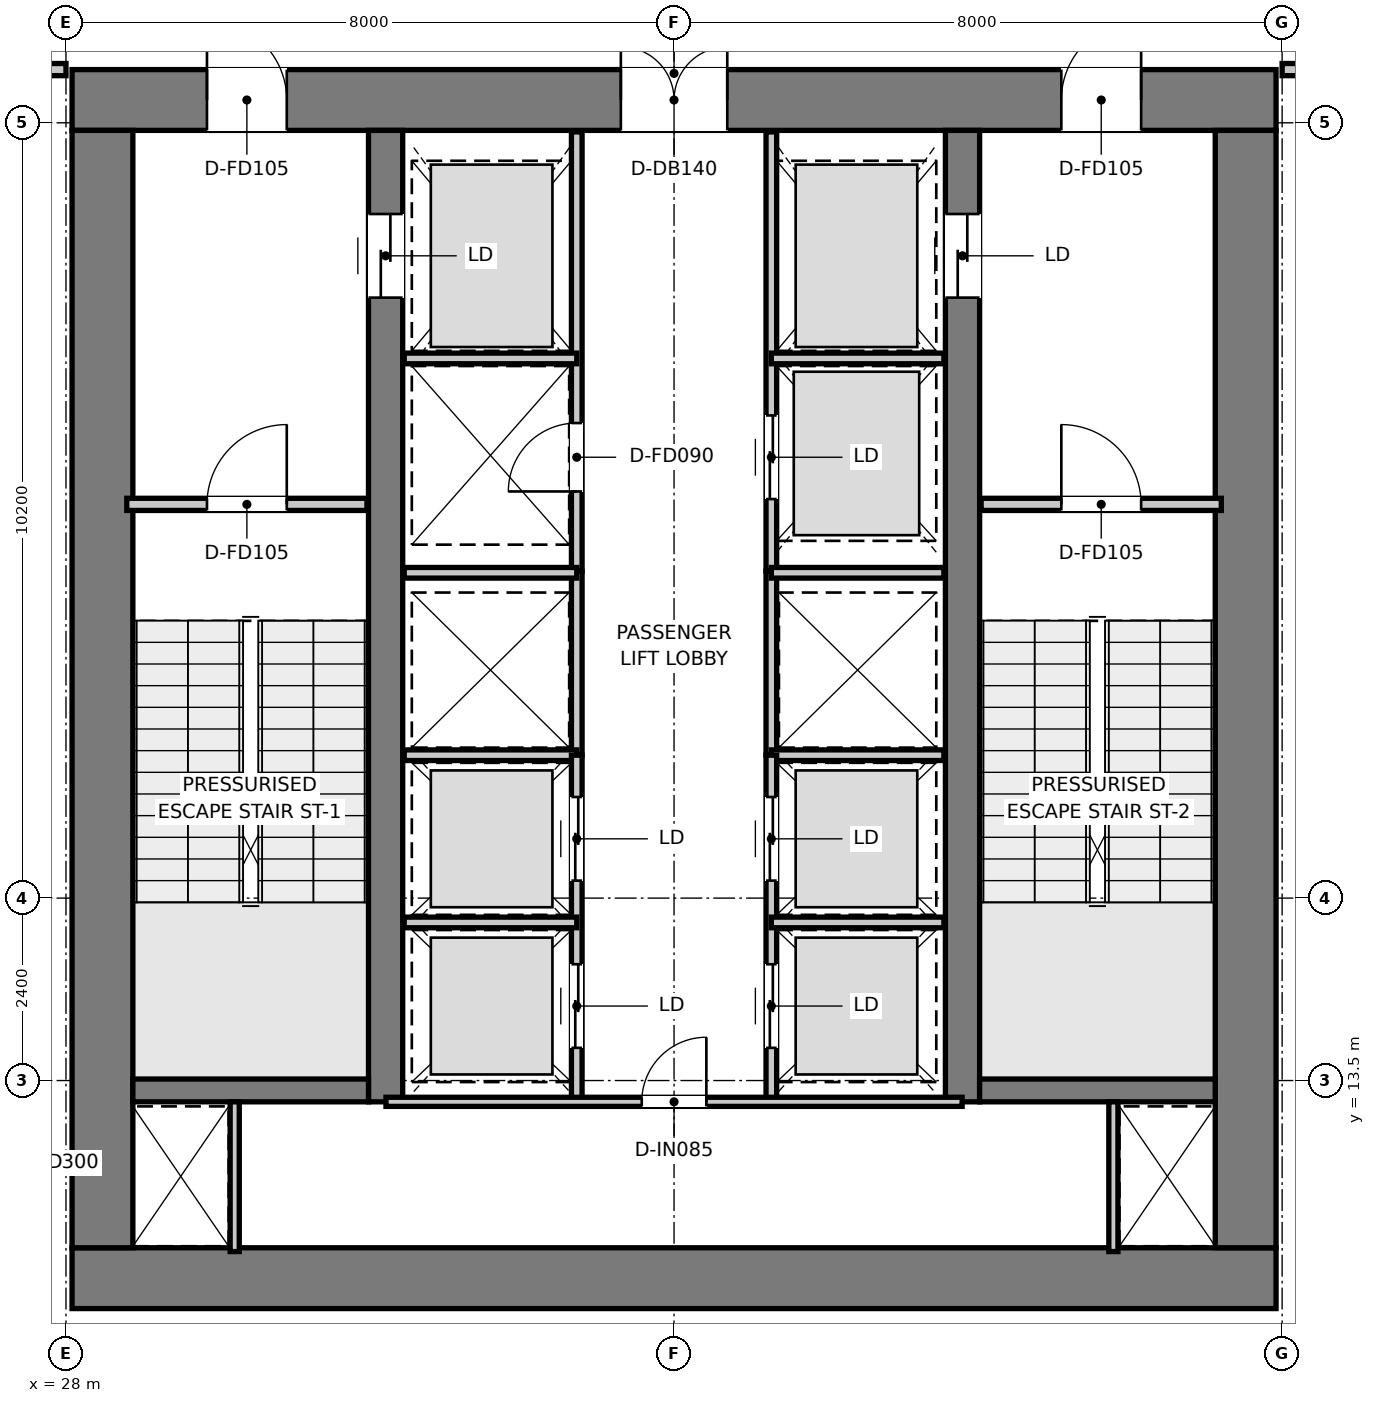
"""IFC4 building model, lengths in metres.
Left out: names, types, materials, properties, quantities, classifications, styles, units other than length and angle.
Written with IfcOpenShell. Run it as: python <this file> out.ifc"""

import sys

from ifc_helpers import new_model, si_unit, direction, frame, frame_2d, origin, place, context, subcontext, project, spatial, rectangle, extrude, element, fill, save


model = new_model("IFC4")
c1 = context("Model", 3, precision=1e-05, world=origin(), true_north=direction((0.0, 1.0)))
c2 = subcontext(c1, "Body", "Model", "MODEL_VIEW")
j1 = project(units=[si_unit("LENGTHUNIT", "METRE"), si_unit("PLANEANGLEUNIT", "RADIAN")], contexts=[c1])
p1 = place(None, origin())
s1 = spatial("IfcSite", under=j1, at=p1, CompositionType="ELEMENT")
p2 = place(p1, origin())
s2 = spatial("IfcBuilding", under=s1, at=p2, CompositionType="ELEMENT")
p3 = place(p2, frame((0.0, 0.0, 15.4)))
s3 = spatial("IfcBuildingStorey", under=s2, at=p3, CompositionType="ELEMENT", Elevation=15.4)
p4 = place(p3, frame((28.08, 10.9, 0.0), z_axis=(0.0, 0.0, 1.0), x_axis=(1.0, 0.0, 0.0)))
e1 = element("IfcWall", 1, at=p4, inside=s3, PredefinedType="SHEAR", context=c2, shape_type="SweptSolid", body=[
    extrude(rectangle(XDim=15.84, YDim=0.8, at=frame_2d((7.92, 0.0))), origin(), (0.0, 0.0, 1.0), 4.6),
])
p5 = place(p3, frame((28.08, 26.4, 0.0), z_axis=(0.0, 0.0, 1.0), x_axis=(1.0, 0.0, 0.0)))
e2 = element("IfcWall", 2, at=p5, inside=s3, PredefinedType="SHEAR", context=c2, shape_type="SweptSolid", body=[
    extrude(rectangle(XDim=15.84, YDim=0.8, at=frame_2d((7.92, 0.0))), origin(), (0.0, 0.0, 1.0), 4.6),
])
p6 = place(p5, frame((7.22, 0.0, 0.0)))
e3 = element("IfcOpeningElement", 3, at=p6, cuts=e2, PredefinedType="OPENING", context=c2, shape_type="SweptSolid", body=[
    extrude(rectangle(XDim=1.4, YDim=2.2, at=frame_2d((0.7, 1.1))), frame((0.0, 0.41, 0.0), z_axis=(0.0, -1.0, 0.0), x_axis=(1.0, 0.0, 0.0)), (0.0, 0.0, 1.0), 0.82),
])
p7 = place(p5, frame((1.775, 0.0, 0.0)))
e4 = element("IfcOpeningElement", 4, at=p7, cuts=e2, PredefinedType="OPENING", context=c2, shape_type="SweptSolid", body=[
    extrude(rectangle(XDim=1.05, YDim=2.1, at=frame_2d((0.525, 1.05))), frame((0.0, 0.41, 0.0), z_axis=(0.0, -1.0, 0.0), x_axis=(1.0, 0.0, 0.0)), (0.0, 0.0, 1.0), 0.82),
])
p8 = place(p5, frame((13.015, 0.0, 0.0)))
e5 = element("IfcOpeningElement", 5, at=p8, cuts=e2, PredefinedType="OPENING", context=c2, shape_type="SweptSolid", body=[
    extrude(rectangle(XDim=1.05, YDim=2.1, at=frame_2d((0.525, 1.05))), frame((0.0, 0.41, 0.0), z_axis=(0.0, -1.0, 0.0), x_axis=(1.0, 0.0, 0.0)), (0.0, 0.0, 1.0), 0.82),
])
for number, where, z_axis, x_axis in (
    (6, (28.48, 11.3, 0.0), (0.0, 0.0, 1.0), (0.0, 1.0, 0.0)),
    (7, (43.52, 11.3, 0.0), (0.0, 0.0, 1.0), (0.0, 1.0, 0.0)),
):
    element("IfcWall", number, at=place(p3, frame(where, z_axis=z_axis, x_axis=x_axis)), inside=s3, PredefinedType="SHEAR", context=c2, shape_type="SweptSolid", body=[
        extrude(rectangle(XDim=14.7, YDim=0.8, at=frame_2d((7.35, 0.0))), origin(), (0.0, 0.0, 1.0), 4.6),
    ])
p9 = place(p3, frame((32.205, 13.22, 0.0), z_axis=(0.0, 0.0, 1.0), x_axis=(0.0, 1.0, 0.0)))
e8 = element("IfcWall", 8, at=p9, inside=s3, PredefinedType="SHEAR", context=c2, shape_type="SweptSolid", body=[
    extrude(rectangle(XDim=12.78, YDim=0.45, at=frame_2d((6.39, 0.0))), origin(), (0.0, 0.0, 1.0), 4.6),
])
p10 = place(p9, frame((10.58, 0.0, 0.0)))
e9 = element("IfcOpeningElement", 9, at=p10, cuts=e8, PredefinedType="OPENING", context=c2, shape_type="SweptSolid", body=[
    extrude(rectangle(XDim=1.1, YDim=2.15, at=frame_2d((0.55, 1.075))), frame((0.0, 0.235, 0.0), z_axis=(0.0, -1.0, 0.0), x_axis=(1.0, 0.0, 0.0)), (0.0, 0.0, 1.0), 0.47),
])
p11 = place(p3, frame((39.795, 13.22, 0.0), z_axis=(0.0, 0.0, 1.0), x_axis=(0.0, 1.0, 0.0)))
e10 = element("IfcWall", 10, at=p11, inside=s3, PredefinedType="SHEAR", context=c2, shape_type="SweptSolid", body=[
    extrude(rectangle(XDim=12.78, YDim=0.45, at=frame_2d((6.39, 0.0))), origin(), (0.0, 0.0, 1.0), 4.6),
])
p12 = place(p11, frame((10.58, 0.0, 0.0)))
e11 = element("IfcOpeningElement", 11, at=p12, cuts=e10, PredefinedType="OPENING", context=c2, shape_type="SweptSolid", body=[
    extrude(rectangle(XDim=1.1, YDim=2.15, at=frame_2d((0.55, 1.075))), frame((0.0, 0.235, 0.0), z_axis=(0.0, -1.0, 0.0), x_axis=(1.0, 0.0, 0.0)), (0.0, 0.0, 1.0), 0.47),
])
for number, where, z_axis, x_axis in (
    (12, (28.88, 13.37, 0.0), (0.0, 0.0, 1.0), (1.0, 0.0, 0.0)),
    (13, (40.02, 13.37, 0.0), (0.0, 0.0, 1.0), (1.0, 0.0, 0.0)),
):
    element("IfcWall", number, at=place(p3, frame(where, z_axis=z_axis, x_axis=x_axis)), inside=s3, PredefinedType="SHEAR", context=c2, shape_type="SweptSolid", body=[
        extrude(rectangle(XDim=3.1, YDim=0.3, at=frame_2d((1.55, 0.0))), origin(), (0.0, 0.0, 1.0), 4.6),
    ])
p13 = place(p3, frame((28.8, 21.08, 0.0), z_axis=(0.0, 0.0, 1.0), x_axis=(1.0, 0.0, 0.0)))
e14 = element("IfcWall", 14, at=p13, inside=s3, PredefinedType="PARTITIONING", context=c2, shape_type="SweptSolid", body=[
    extrude(rectangle(XDim=3.16, YDim=0.16, at=frame_2d((1.58, 0.0))), origin(), (0.0, 0.0, 1.0), 4.25),
])
p14 = place(p13, frame((1.055, 0.0, 0.0)))
e15 = element("IfcOpeningElement", 15, at=p14, cuts=e14, PredefinedType="OPENING", context=c2, shape_type="SweptSolid", body=[
    extrude(rectangle(XDim=1.05, YDim=2.1, at=frame_2d((0.525, 1.05))), frame((0.0, 0.09, 0.0), z_axis=(0.0, -1.0, 0.0), x_axis=(1.0, 0.0, 0.0)), (0.0, 0.0, 1.0), 0.18),
])
p15 = place(p3, frame((40.04, 21.08, 0.0), z_axis=(0.0, 0.0, 1.0), x_axis=(1.0, 0.0, 0.0)))
e16 = element("IfcWall", 16, at=p15, inside=s3, PredefinedType="PARTITIONING", context=c2, shape_type="SweptSolid", body=[
    extrude(rectangle(XDim=3.16, YDim=0.16, at=frame_2d((1.58, 0.0))), origin(), (0.0, 0.0, 1.0), 4.25),
])
p16 = place(p15, frame((1.055, 0.0, 0.0)))
e17 = element("IfcOpeningElement", 17, at=p16, cuts=e16, PredefinedType="OPENING", context=c2, shape_type="SweptSolid", body=[
    extrude(rectangle(XDim=1.05, YDim=2.1, at=frame_2d((0.525, 1.05))), frame((0.0, 0.09, 0.0), z_axis=(0.0, -1.0, 0.0), x_axis=(1.0, 0.0, 0.0)), (0.0, 0.0, 1.0), 0.18),
])
p17 = place(p3, frame((34.72, 20.2, 0.0), z_axis=(0.0, 0.0, 1.0), x_axis=(0.0, 1.0, 0.0)))
e18 = element("IfcWall", 18, at=p17, inside=s3, PredefinedType="PARTITIONING", context=c2, shape_type="SweptSolid", body=[
    extrude(rectangle(XDim=5.78, YDim=0.14, at=frame_2d((2.89, 0.0))), origin(), (0.0, 0.0, 1.0), 3.05),
])
p18 = place(p17, frame((1.05, 0.0, 0.0)))
e19 = element("IfcOpeningElement", 19, at=p18, cuts=e18, PredefinedType="OPENING", context=c2, shape_type="SweptSolid", body=[
    extrude(rectangle(XDim=0.9, YDim=2.1, at=frame_2d((0.45, 1.05))), frame((0.0, 0.08, 0.0), z_axis=(0.0, -1.0, 0.0), x_axis=(1.0, 0.0, 0.0)), (0.0, 0.0, 1.0), 0.16),
])
p19 = place(p3, frame((37.28, 20.2, 0.0), z_axis=(0.0, 0.0, 1.0), x_axis=(0.0, 1.0, 0.0)))
e20 = element("IfcWall", 20, at=p19, inside=s3, PredefinedType="PARTITIONING", context=c2, shape_type="SweptSolid", body=[
    extrude(rectangle(XDim=5.78, YDim=0.14, at=frame_2d((2.89, 0.0))), origin(), (0.0, 0.0, 1.0), 3.05),
])
p20 = place(p19, frame((0.95, 0.0, 0.0)))
e21 = element("IfcOpeningElement", 21, at=p20, cuts=e20, PredefinedType="OPENING", context=c2, shape_type="SweptSolid", body=[
    extrude(rectangle(XDim=1.1, YDim=2.15, at=frame_2d((0.55, 1.075))), frame((0.0, 0.08, 0.0), z_axis=(0.0, -1.0, 0.0), x_axis=(1.0, 0.0, 0.0)), (0.0, 0.0, 1.0), 0.16),
])
for number, where, z_axis, x_axis in (
    (22, (32.45, 23.0, 0.0), (0.0, 0.0, 1.0), (1.0, 0.0, 0.0)),
    (23, (37.28, 23.0, 0.0), (0.0, 0.0, 1.0), (1.0, 0.0, 0.0)),
):
    element("IfcWall", number, at=place(p3, frame(where, z_axis=z_axis, x_axis=x_axis)), inside=s3, PredefinedType="PARTITIONING", context=c2, shape_type="SweptSolid", body=[
        extrude(rectangle(XDim=2.27, YDim=0.14, at=frame_2d((1.135, 0.0))), origin(), (0.0, 0.0, 1.0), 3.05),
    ])
for number, where, z_axis, x_axis in (
    (24, (34.72, 17.78, 0.0), (0.0, 0.0, 1.0), (0.0, 1.0, 0.0)),
    (25, (37.28, 17.78, 0.0), (0.0, 0.0, 1.0), (0.0, 1.0, 0.0)),
):
    element("IfcWall", number, at=place(p3, frame(where, z_axis=z_axis, x_axis=x_axis)), inside=s3, PredefinedType="PARTITIONING", context=c2, shape_type="SweptSolid", body=[
        extrude(rectangle(XDim=2.42, YDim=0.14, at=frame_2d((1.21, 0.0))), origin(), (0.0, 0.0, 1.0), 4.25),
    ])
for number, where, z_axis, x_axis in (
    (26, (32.45, 17.78, 0.0), (0.0, 0.0, 1.0), (1.0, 0.0, 0.0)),
    (27, (32.45, 20.18, 0.0), (0.0, 0.0, 1.0), (1.0, 0.0, 0.0)),
    (28, (37.28, 17.78, 0.0), (0.0, 0.0, 1.0), (1.0, 0.0, 0.0)),
    (29, (37.28, 20.18, 0.0), (0.0, 0.0, 1.0), (1.0, 0.0, 0.0)),
):
    element("IfcWall", number, at=place(p3, frame(where, z_axis=z_axis, x_axis=x_axis)), inside=s3, PredefinedType="PARTITIONING", context=c2, shape_type="SweptSolid", body=[
        extrude(rectangle(XDim=2.27, YDim=0.14, at=frame_2d((1.135, 0.0))), origin(), (0.0, 0.0, 1.0), 4.25),
    ])
p21 = place(p3, frame((34.72, 13.22, 0.0), z_axis=(0.0, 0.0, 1.0), x_axis=(0.0, 1.0, 0.0)))
e30 = element("IfcWall", 30, at=p21, inside=s3, PredefinedType="PARTITIONING", context=c2, shape_type="SweptSolid", body=[
    extrude(rectangle(XDim=4.56, YDim=0.14, at=frame_2d((2.28, 0.0))), origin(), (0.0, 0.0, 1.0), 4.25),
])
p22 = place(p21, frame((0.71, 0.0, 0.0)))
e31 = element("IfcOpeningElement", 31, at=p22, cuts=e30, PredefinedType="OPENING", context=c2, shape_type="SweptSolid", body=[
    extrude(rectangle(XDim=1.1, YDim=2.15, at=frame_2d((0.55, 1.075))), frame((0.0, 0.08, 0.0), z_axis=(0.0, -1.0, 0.0), x_axis=(1.0, 0.0, 0.0)), (0.0, 0.0, 1.0), 0.16),
])
p23 = place(p21, frame((2.91, 0.0, 0.0)))
e32 = element("IfcOpeningElement", 32, at=p23, cuts=e30, PredefinedType="OPENING", context=c2, shape_type="SweptSolid", body=[
    extrude(rectangle(XDim=1.1, YDim=2.15, at=frame_2d((0.55, 1.075))), frame((0.0, 0.08, 0.0), z_axis=(0.0, -1.0, 0.0), x_axis=(1.0, 0.0, 0.0)), (0.0, 0.0, 1.0), 0.16),
])
p24 = place(p3, frame((32.45, 15.58, 0.0), z_axis=(0.0, 0.0, 1.0), x_axis=(1.0, 0.0, 0.0)))
e33 = element("IfcWall", 33, at=p24, inside=s3, PredefinedType="PARTITIONING", context=c2, shape_type="SweptSolid", body=[
    extrude(rectangle(XDim=2.27, YDim=0.14, at=frame_2d((1.135, 0.0))), origin(), (0.0, 0.0, 1.0), 4.25),
])
p25 = place(p3, frame((37.28, 13.22, 0.0), z_axis=(0.0, 0.0, 1.0), x_axis=(0.0, 1.0, 0.0)))
e34 = element("IfcWall", 34, at=p25, inside=s3, PredefinedType="PARTITIONING", context=c2, shape_type="SweptSolid", body=[
    extrude(rectangle(XDim=4.56, YDim=0.14, at=frame_2d((2.28, 0.0))), origin(), (0.0, 0.0, 1.0), 4.25),
])
p26 = place(p25, frame((0.71, 0.0, 0.0)))
e35 = element("IfcOpeningElement", 35, at=p26, cuts=e34, PredefinedType="OPENING", context=c2, shape_type="SweptSolid", body=[
    extrude(rectangle(XDim=1.1, YDim=2.15, at=frame_2d((0.55, 1.075))), frame((0.0, 0.08, 0.0), z_axis=(0.0, -1.0, 0.0), x_axis=(1.0, 0.0, 0.0)), (0.0, 0.0, 1.0), 0.16),
])
p27 = place(p25, frame((2.91, 0.0, 0.0)))
e36 = element("IfcOpeningElement", 36, at=p27, cuts=e34, PredefinedType="OPENING", context=c2, shape_type="SweptSolid", body=[
    extrude(rectangle(XDim=1.1, YDim=2.15, at=frame_2d((0.55, 1.075))), frame((0.0, 0.08, 0.0), z_axis=(0.0, -1.0, 0.0), x_axis=(1.0, 0.0, 0.0)), (0.0, 0.0, 1.0), 0.16),
])
p28 = place(p3, frame((37.28, 15.58, 0.0), z_axis=(0.0, 0.0, 1.0), x_axis=(1.0, 0.0, 0.0)))
e37 = element("IfcWall", 37, at=p28, inside=s3, PredefinedType="PARTITIONING", context=c2, shape_type="SweptSolid", body=[
    extrude(rectangle(XDim=2.27, YDim=0.14, at=frame_2d((1.135, 0.0))), origin(), (0.0, 0.0, 1.0), 4.25),
])
for number, where, z_axis, x_axis in (
    (38, (30.22, 11.25, 0.0), (0.0, 0.0, 1.0), (0.0, 1.0, 0.0)),
    (39, (41.78, 11.25, 0.0), (0.0, 0.0, 1.0), (0.0, 1.0, 0.0)),
):
    element("IfcWall", number, at=place(p3, frame(where, z_axis=z_axis, x_axis=x_axis)), inside=s3, PredefinedType="PARTITIONING", context=c2, shape_type="SweptSolid", body=[
        extrude(rectangle(XDim=1.97, YDim=0.12, at=frame_2d((0.985, 0.0))), origin(), (0.0, 0.0, 1.0), 4.25),
    ])
p29 = place(p3, frame((32.21, 13.22, 0.0), z_axis=(0.0, 0.0, 1.0), x_axis=(1.0, 0.0, 0.0)))
e40 = element("IfcWall", 40, at=p29, inside=s3, PredefinedType="PARTITIONING", context=c2, shape_type="SweptSolid", body=[
    extrude(rectangle(XDim=7.58, YDim=0.12, at=frame_2d((3.79, 0.0))), origin(), (0.0, 0.0, 1.0), 4.25),
])
p30 = place(p29, frame((3.365, 0.0, 0.0)))
e41 = element("IfcOpeningElement", 41, at=p30, cuts=e40, PredefinedType="OPENING", context=c2, shape_type="SweptSolid", body=[
    extrude(rectangle(XDim=0.85, YDim=2.1, at=frame_2d((0.425, 1.05))), frame((0.0, 0.07, 0.0), z_axis=(0.0, -1.0, 0.0), x_axis=(1.0, 0.0, 0.0)), (0.0, 0.0, 1.0), 0.14),
])
p31 = place(p3, frame((22.32, 26.8, 0.0), z_axis=(0.0, 0.0, 1.0), x_axis=(1.0, 0.0, 0.0)))
e42 = element("IfcWall", 42, at=p31, inside=s3, PredefinedType="PARTITIONING", context=c2, shape_type="SweptSolid", body=[
    extrude(rectangle(XDim=5.68, YDim=0.16, at=frame_2d((2.84, 0.0))), origin(), (0.0, 0.0, 1.0), 3.45),
])
p32 = place(p31, frame((3.63, 0.0, 0.0)))
e43 = element("IfcOpeningElement", 43, at=p32, cuts=e42, PredefinedType="OPENING", context=c2, shape_type="SweptSolid", body=[
    extrude(rectangle(XDim=1.1, YDim=2.15, at=frame_2d((0.55, 1.075))), frame((0.0, 0.09, 0.0), z_axis=(0.0, -1.0, 0.0), x_axis=(1.0, 0.0, 0.0)), (0.0, 0.0, 1.0), 0.18),
])
p33 = place(p3, frame((44.0, 26.8, 0.0), z_axis=(0.0, 0.0, 1.0), x_axis=(1.0, 0.0, 0.0)))
e44 = element("IfcWall", 44, at=p33, inside=s3, PredefinedType="PARTITIONING", context=c2, shape_type="SweptSolid", body=[
    extrude(rectangle(XDim=10.08, YDim=0.16, at=frame_2d((5.04, 0.0))), origin(), (0.0, 0.0, 1.0), 3.45),
])
p34 = place(p33, frame((4.4, 0.0, 0.0)))
e45 = element("IfcOpeningElement", 45, at=p34, cuts=e44, PredefinedType="OPENING", context=c2, shape_type="SweptSolid", body=[
    extrude(rectangle(XDim=1.2, YDim=2.15, at=frame_2d((0.6, 1.075))), frame((0.0, 0.09, 0.0), z_axis=(0.0, -1.0, 0.0), x_axis=(1.0, 0.0, 0.0)), (0.0, 0.0, 1.0), 0.18),
])
p35 = place(p14, origin())
e46 = element("IfcDoor", 46, at=p35, inside=s3, OperationType="SINGLE_SWING_RIGHT", PredefinedType="DOOR", context=c2, shape_type="SweptSolid", body=[
    extrude(rectangle(XDim=1.05, YDim=2.1, at=frame_2d((0.525, 1.05))), frame((0.0, 0.025, 0.0), z_axis=(0.0, -1.0, 0.0), x_axis=(1.0, 0.0, 0.0)), (0.0, 0.0, 1.0), 0.05),
])
fill(e15, e46)
p36 = place(p16, origin())
e47 = element("IfcDoor", 47, at=p36, inside=s3, OperationType="SINGLE_SWING_LEFT", PredefinedType="DOOR", context=c2, shape_type="SweptSolid", body=[
    extrude(rectangle(XDim=1.05, YDim=2.1, at=frame_2d((0.525, 1.05))), frame((0.0, 0.025, 0.0), z_axis=(0.0, -1.0, 0.0), x_axis=(1.0, 0.0, 0.0)), (0.0, 0.0, 1.0), 0.05),
])
fill(e17, e47)
p37 = place(p6, origin())
e48 = element("IfcDoor", 48, at=p37, inside=s3, OperationType="DOUBLE_DOOR_SINGLE_SWING", PredefinedType="DOOR", context=c2, shape_type="SweptSolid", body=[
    extrude(rectangle(XDim=1.4, YDim=2.2, at=frame_2d((0.7, 1.1))), frame((0.0, 0.025, 0.0), z_axis=(0.0, -1.0, 0.0), x_axis=(1.0, 0.0, 0.0)), (0.0, 0.0, 1.0), 0.05),
])
fill(e3, e48)
p38 = place(p7, origin())
e49 = element("IfcDoor", 49, at=p38, inside=s3, OperationType="SINGLE_SWING_LEFT", PredefinedType="DOOR", context=c2, shape_type="SweptSolid", body=[
    extrude(rectangle(XDim=1.05, YDim=2.1, at=frame_2d((0.525, 1.05))), frame((0.0, 0.025, 0.0), z_axis=(0.0, -1.0, 0.0), x_axis=(1.0, 0.0, 0.0)), (0.0, 0.0, 1.0), 0.05),
])
fill(e4, e49)
p39 = place(p8, origin())
e50 = element("IfcDoor", 50, at=p39, inside=s3, OperationType="SINGLE_SWING_RIGHT", PredefinedType="DOOR", context=c2, shape_type="SweptSolid", body=[
    extrude(rectangle(XDim=1.05, YDim=2.1, at=frame_2d((0.525, 1.05))), frame((0.0, 0.025, 0.0), z_axis=(0.0, -1.0, 0.0), x_axis=(1.0, 0.0, 0.0)), (0.0, 0.0, 1.0), 0.05),
])
fill(e5, e50)
p40 = place(p10, origin())
e51 = element("IfcDoor", 51, at=p40, inside=s3, OperationType="DOUBLE_DOOR_SLIDING", PredefinedType="DOOR", context=c2, shape_type="SweptSolid", body=[
    extrude(rectangle(XDim=1.1, YDim=2.15, at=frame_2d((0.55, 1.075))), frame((0.0, 0.025, 0.0), z_axis=(0.0, -1.0, 0.0), x_axis=(1.0, 0.0, 0.0)), (0.0, 0.0, 1.0), 0.05),
])
fill(e9, e51)
p41 = place(p12, origin())
e52 = element("IfcDoor", 52, at=p41, inside=s3, OperationType="DOUBLE_DOOR_SLIDING", PredefinedType="DOOR", context=c2, shape_type="SweptSolid", body=[
    extrude(rectangle(XDim=1.1, YDim=2.15, at=frame_2d((0.55, 1.075))), frame((0.0, 0.025, 0.0), z_axis=(0.0, -1.0, 0.0), x_axis=(1.0, 0.0, 0.0)), (0.0, 0.0, 1.0), 0.05),
])
fill(e11, e52)
p42 = place(p18, origin())
e53 = element("IfcDoor", 53, at=p42, inside=s3, OperationType="SINGLE_SWING_LEFT", PredefinedType="DOOR", context=c2, shape_type="SweptSolid", body=[
    extrude(rectangle(XDim=0.9, YDim=2.1, at=frame_2d((0.45, 1.05))), frame((0.0, 0.025, 0.0), z_axis=(0.0, -1.0, 0.0), x_axis=(1.0, 0.0, 0.0)), (0.0, 0.0, 1.0), 0.05),
])
fill(e19, e53)
p43 = place(p20, origin())
e54 = element("IfcDoor", 54, at=p43, inside=s3, OperationType="DOUBLE_DOOR_SLIDING", PredefinedType="DOOR", context=c2, shape_type="SweptSolid", body=[
    extrude(rectangle(XDim=1.1, YDim=2.15, at=frame_2d((0.55, 1.075))), frame((0.0, 0.025, 0.0), z_axis=(0.0, -1.0, 0.0), x_axis=(1.0, 0.0, 0.0)), (0.0, 0.0, 1.0), 0.05),
])
fill(e21, e54)
p44 = place(p22, origin())
e55 = element("IfcDoor", 55, at=p44, inside=s3, OperationType="DOUBLE_DOOR_SLIDING", PredefinedType="DOOR", context=c2, shape_type="SweptSolid", body=[
    extrude(rectangle(XDim=1.1, YDim=2.15, at=frame_2d((0.55, 1.075))), frame((0.0, 0.025, 0.0), z_axis=(0.0, -1.0, 0.0), x_axis=(1.0, 0.0, 0.0)), (0.0, 0.0, 1.0), 0.05),
])
fill(e31, e55)
p45 = place(p23, origin())
e56 = element("IfcDoor", 56, at=p45, inside=s3, OperationType="DOUBLE_DOOR_SLIDING", PredefinedType="DOOR", context=c2, shape_type="SweptSolid", body=[
    extrude(rectangle(XDim=1.1, YDim=2.15, at=frame_2d((0.55, 1.075))), frame((0.0, 0.025, 0.0), z_axis=(0.0, -1.0, 0.0), x_axis=(1.0, 0.0, 0.0)), (0.0, 0.0, 1.0), 0.05),
])
fill(e32, e56)
p46 = place(p26, origin())
e57 = element("IfcDoor", 57, at=p46, inside=s3, OperationType="DOUBLE_DOOR_SLIDING", PredefinedType="DOOR", context=c2, shape_type="SweptSolid", body=[
    extrude(rectangle(XDim=1.1, YDim=2.15, at=frame_2d((0.55, 1.075))), frame((0.0, 0.025, 0.0), z_axis=(0.0, -1.0, 0.0), x_axis=(1.0, 0.0, 0.0)), (0.0, 0.0, 1.0), 0.05),
])
fill(e35, e57)
p47 = place(p27, origin())
e58 = element("IfcDoor", 58, at=p47, inside=s3, OperationType="DOUBLE_DOOR_SLIDING", PredefinedType="DOOR", context=c2, shape_type="SweptSolid", body=[
    extrude(rectangle(XDim=1.1, YDim=2.15, at=frame_2d((0.55, 1.075))), frame((0.0, 0.025, 0.0), z_axis=(0.0, -1.0, 0.0), x_axis=(1.0, 0.0, 0.0)), (0.0, 0.0, 1.0), 0.05),
])
fill(e36, e58)
p48 = place(p30, origin())
e59 = element("IfcDoor", 59, at=p48, inside=s3, OperationType="SINGLE_SWING_RIGHT", PredefinedType="DOOR", context=c2, shape_type="SweptSolid", body=[
    extrude(rectangle(XDim=0.85, YDim=2.1, at=frame_2d((0.425, 1.05))), frame((0.0, 0.025, 0.0), z_axis=(0.0, -1.0, 0.0), x_axis=(1.0, 0.0, 0.0)), (0.0, 0.0, 1.0), 0.05),
])
fill(e41, e59)
save(model, sys.argv[1])
